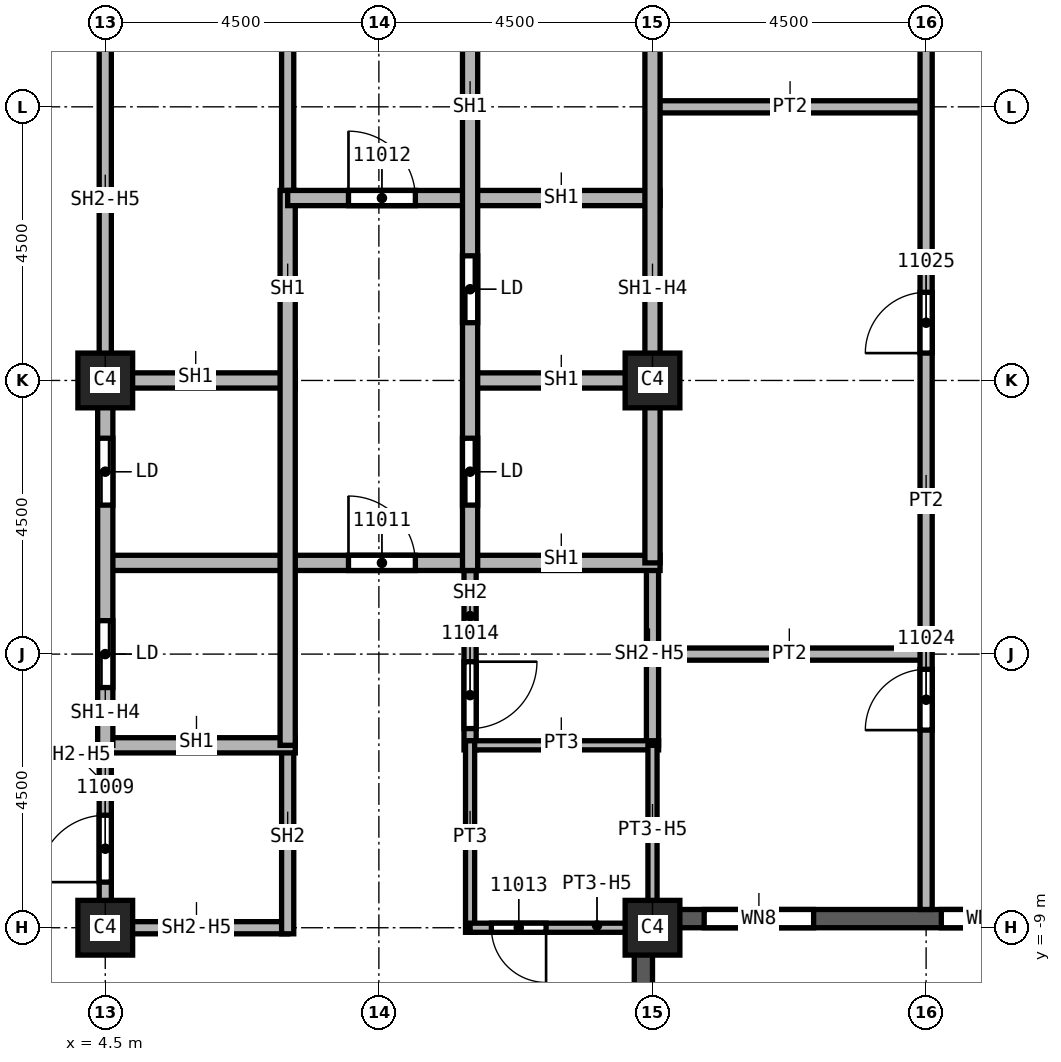
"""IFC4 building model, lengths in metres.
Left out: names, types, materials, properties, quantities, classifications, styles, units other than length and angle.
Written with IfcOpenShell. Run it as: python <this file> out.ifc"""

import sys

from ifc_helpers import new_model, si_unit, direction, frame, frame_2d, origin, origin_2d, place, context, subcontext, project, spatial, rectangle, extrude, element, fill, save


model = new_model("IFC4")
c1 = context("Model", 3, precision=1e-05, world=origin(), true_north=direction((0.0, 1.0)))
c2 = subcontext(c1, "Body", "Model", "MODEL_VIEW")
j1 = project(units=[si_unit("LENGTHUNIT", "METRE"), si_unit("PLANEANGLEUNIT", "RADIAN")], contexts=[c1])
p1 = place(None, origin())
s1 = spatial("IfcSite", under=j1, at=p1, CompositionType="ELEMENT")
p2 = place(p1, origin())
s2 = spatial("IfcBuilding", under=s1, at=p2, CompositionType="ELEMENT")
p3 = place(p2, frame((0.0, 0.0, 184.0)))
s3 = spatial("IfcBuildingStorey", under=s2, at=p3, CompositionType="ELEMENT", Elevation=184.0)
for number, where, z_axis, x_axis in (
    (1, (4.5, 0.0, 0.0), (0.0, 0.0, 1.0), (1.0, 0.0, 0.0)),
    (2, (4.5, -9.0, 0.0), (0.0, 0.0, 1.0), (1.0, 0.0, 0.0)),
    (3, (13.5, 0.0, 0.0), (0.0, 0.0, 1.0), (1.0, 0.0, 0.0)),
    (4, (13.5, -9.0, 0.0), (0.0, 0.0, 1.0), (1.0, 0.0, 0.0)),
):
    element("IfcColumn", number, at=place(p3, frame(where, z_axis=z_axis, x_axis=x_axis)), inside=s3, PredefinedType="COLUMN", context=c2, shape_type="SweptSolid", body=[
        extrude(rectangle(XDim=0.9, YDim=0.9, at=origin_2d()), origin(), (0.0, 0.0, 1.0), 3.72),
    ])
p4 = place(p3, frame((13.35, -17.5, 0.0), z_axis=(0.0, 0.0, 1.0), x_axis=(0.0, 1.0, 0.0)))
e5 = element("IfcWall", 5, at=p4, inside=s3, PredefinedType="SOLIDWALL", context=c2, shape_type="SweptSolid", body=[
    extrude(rectangle(XDim=8.475, YDim=0.3, at=frame_2d((4.238, 0.0))), origin(), (0.0, 0.0, 1.0), 3.12),
])
p5 = place(p4, frame((0.812, 0.0, 0.8)))
e6 = element("IfcOpeningElement", 6, at=p5, cuts=e5, PredefinedType="OPENING", context=c2, shape_type="SweptSolid", body=[
    extrude(rectangle(XDim=2.4, YDim=1.95, at=frame_2d((1.2, 0.975))), frame((0.0, 0.15, 0.0), z_axis=(0.0, -1.0, 0.0), x_axis=(1.0, 0.0, 0.0)), (0.0, 0.0, 1.0), 0.3),
])
p6 = place(p4, frame((5.431, 0.0, 0.8)))
e7 = element("IfcOpeningElement", 7, at=p6, cuts=e5, PredefinedType="OPENING", context=c2, shape_type="SweptSolid", body=[
    extrude(rectangle(XDim=1.8, YDim=1.95, at=frame_2d((0.9, 0.975))), frame((0.0, 0.15, 0.0), z_axis=(0.0, -1.0, 0.0), x_axis=(1.0, 0.0, 0.0)), (0.0, 0.0, 1.0), 0.3),
])
p7 = place(p3, frame((13.525, -8.85, 0.0), z_axis=(0.0, 0.0, 1.0), x_axis=(1.0, 0.0, 0.0)))
e8 = element("IfcWall", 8, at=p7, inside=s3, PredefinedType="SOLIDWALL", context=c2, shape_type="SweptSolid", body=[
    extrude(rectangle(XDim=8.475, YDim=0.3, at=frame_2d((4.238, 0.0))), origin(), (0.0, 0.0, 1.0), 3.12),
])
p8 = place(p7, frame((0.825, 0.0, 0.8)))
e9 = element("IfcOpeningElement", 9, at=p8, cuts=e8, PredefinedType="OPENING", context=c2, shape_type="SweptSolid", body=[
    extrude(rectangle(XDim=1.8, YDim=1.95, at=frame_2d((0.9, 0.975))), frame((0.0, 0.15, 0.0), z_axis=(0.0, -1.0, 0.0), x_axis=(1.0, 0.0, 0.0)), (0.0, 0.0, 1.0), 0.3),
])
p9 = place(p7, frame((4.725, 0.0, 0.8)))
e10 = element("IfcOpeningElement", 10, at=p9, cuts=e8, PredefinedType="OPENING", context=c2, shape_type="SweptSolid", body=[
    extrude(rectangle(XDim=1.4, YDim=1.95, at=frame_2d((0.7, 0.975))), frame((0.0, 0.15, 0.0), z_axis=(0.0, -1.0, 0.0), x_axis=(1.0, 0.0, 0.0)), (0.0, 0.0, 1.0), 0.3),
])
for number, where, z_axis, x_axis in (
    (11, (13.5, -4.5, 0.0), (0.0, 0.0, 1.0), (1.0, 0.0, 0.0)),
    (12, (13.5, 4.5, 0.0), (0.0, 0.0, 1.0), (1.0, 0.0, 0.0)),
):
    element("IfcWall", number, at=place(p3, frame(where, z_axis=z_axis, x_axis=x_axis)), inside=s3, PredefinedType="PARTITIONING", context=c2, shape_type="SweptSolid", body=[
        extrude(rectangle(XDim=4.5, YDim=0.2, at=frame_2d((2.25, 0.0))), origin(), (0.0, 0.0, 1.0), 3.72),
    ])
p10 = place(p3, frame((18.0, -8.7, 0.0), z_axis=(0.0, 0.0, 1.0), x_axis=(0.0, 1.0, 0.0)))
e13 = element("IfcWall", 13, at=p10, inside=s3, PredefinedType="PARTITIONING", context=c2, shape_type="SweptSolid", body=[
    extrude(rectangle(XDim=17.8, YDim=0.2, at=frame_2d((8.9, 0.0))), origin(), (0.0, 0.0, 1.0), 3.72),
])
p11 = place(p10, frame((2.95, 0.0, 0.0)))
e14 = element("IfcOpeningElement", 14, at=p11, cuts=e13, PredefinedType="OPENING", context=c2, shape_type="SweptSolid", body=[
    extrude(rectangle(XDim=1.0, YDim=2.1, at=frame_2d((0.5, 1.05))), frame((0.0, 0.1, 0.0), z_axis=(0.0, -1.0, 0.0), x_axis=(1.0, 0.0, 0.0)), (0.0, 0.0, 1.0), 0.2),
])
p12 = place(p10, frame((9.15, 0.0, 0.0)))
e15 = element("IfcOpeningElement", 15, at=p12, cuts=e13, PredefinedType="OPENING", context=c2, shape_type="SweptSolid", body=[
    extrude(rectangle(XDim=1.0, YDim=2.1, at=frame_2d((0.5, 1.05))), frame((0.0, 0.1, 0.0), z_axis=(0.0, -1.0, 0.0), x_axis=(1.0, 0.0, 0.0)), (0.0, 0.0, 1.0), 0.2),
])
p13 = place(p10, frame((15.0, 0.0, 0.0)))
e16 = element("IfcOpeningElement", 16, at=p13, cuts=e13, PredefinedType="OPENING", context=c2, shape_type="SweptSolid", body=[
    extrude(rectangle(XDim=1.0, YDim=2.1, at=frame_2d((0.5, 1.05))), frame((0.0, 0.1, 0.0), z_axis=(0.0, -1.0, 0.0), x_axis=(1.0, 0.0, 0.0)), (0.0, 0.0, 1.0), 0.2),
])
p14 = place(p3, frame((4.5, -9.1, 0.0), z_axis=(0.0, 0.0, 1.0), x_axis=(0.0, 1.0, 0.0)))
e17 = element("IfcWall", 17, at=p14, inside=s3, PredefinedType="SOLIDWALL", context=c2, shape_type="SweptSolid", body=[
    extrude(rectangle(XDim=3.1, YDim=0.2, at=frame_2d((1.55, 0.0))), origin(), (0.0, 0.0, 1.0), 2.958),
])
p15 = place(p14, frame((0.85, 0.0, 0.0)))
e18 = element("IfcOpeningElement", 18, at=p15, cuts=e17, PredefinedType="OPENING", context=c2, shape_type="SweptSolid", body=[
    extrude(rectangle(XDim=1.1, YDim=2.1, at=frame_2d((0.55, 1.05))), frame((0.0, 0.1, 0.0), z_axis=(0.0, -1.0, 0.0), x_axis=(1.0, 0.0, 0.0)), (0.0, 0.0, 1.0), 0.2),
])
p16 = place(p3, frame((4.5, 0.0, 0.0), z_axis=(0.0, 0.0, 1.0), x_axis=(0.0, 1.0, 0.0)))
e19 = element("IfcWall", 19, at=p16, inside=s3, PredefinedType="SOLIDWALL", context=c2, shape_type="SweptSolid", body=[
    extrude(rectangle(XDim=9.1, YDim=0.2, at=frame_2d((4.55, 0.0))), origin(), (0.0, 0.0, 1.0), 2.958),
])
p17 = place(p16, frame((5.8, 0.0, 0.0)))
e20 = element("IfcOpeningElement", 20, at=p17, cuts=e19, PredefinedType="OPENING", context=c2, shape_type="SweptSolid", body=[
    extrude(rectangle(XDim=1.1, YDim=2.1, at=frame_2d((0.55, 1.05))), frame((0.0, 0.1, 0.0), z_axis=(0.0, -1.0, 0.0), x_axis=(1.0, 0.0, 0.0)), (0.0, 0.0, 1.0), 0.2),
])
p18 = place(p3, frame((7.5, -9.0, 0.0), z_axis=(0.0, 0.0, 1.0), x_axis=(-1.0, 0.0, 0.0)))
e21 = element("IfcWall", 21, at=p18, inside=s3, PredefinedType="SOLIDWALL", context=c2, shape_type="SweptSolid", body=[
    extrude(rectangle(XDim=3.0, YDim=0.2, at=frame_2d((1.5, 0.0))), origin(), (0.0, 0.0, 1.0), 2.958),
])
p19 = place(p3, frame((7.5, -6.0, 0.0), z_axis=(0.0, 0.0, 1.0), x_axis=(0.0, -1.0, 0.0)))
e22 = element("IfcWall", 22, at=p19, inside=s3, PredefinedType="SOLIDWALL", context=c2, shape_type="SweptSolid", body=[
    extrude(rectangle(XDim=3.1, YDim=0.2, at=frame_2d((1.55, 0.0))), origin(), (0.0, 0.0, 1.0), 3.72),
])
p20 = place(p3, frame((7.5, 9.1, 0.0), z_axis=(0.0, 0.0, 1.0), x_axis=(0.0, -1.0, 0.0)))
e23 = element("IfcWall", 23, at=p20, inside=s3, PredefinedType="SOLIDWALL", context=c2, shape_type="SweptSolid", body=[
    extrude(rectangle(XDim=6.225, YDim=0.2, at=frame_2d((3.113, 0.0))), origin(), (0.0, 0.0, 1.0), 3.72),
])
p21 = place(p3, frame((10.5, -2.875, 0.0), z_axis=(0.0, 0.0, 1.0), x_axis=(0.0, -1.0, 0.0)))
e24 = element("IfcWall", 24, at=p21, inside=s3, PredefinedType="SOLIDWALL", context=c2, shape_type="SweptSolid", body=[
    extrude(rectangle(XDim=3.2, YDim=0.2, at=frame_2d((1.6, 0.0))), origin(), (0.0, 0.0, 1.0), 3.72),
])
p22 = place(p21, frame((1.75, 0.0, 0.0)))
e25 = element("IfcOpeningElement", 25, at=p22, cuts=e24, PredefinedType="OPENING", context=c2, shape_type="SweptSolid", body=[
    extrude(rectangle(XDim=1.1, YDim=2.1, at=frame_2d((0.55, 1.05))), frame((0.0, 0.1, 0.0), z_axis=(0.0, -1.0, 0.0), x_axis=(1.0, 0.0, 0.0)), (0.0, 0.0, 1.0), 0.2),
])
p23 = place(p3, frame((13.5, -3.0, 0.0), z_axis=(0.0, 0.0, 1.0), x_axis=(0.0, -1.0, 0.0)))
e26 = element("IfcWall", 26, at=p23, inside=s3, PredefinedType="SOLIDWALL", context=c2, shape_type="SweptSolid", body=[
    extrude(rectangle(XDim=3.0, YDim=0.2, at=frame_2d((1.5, 0.0))), origin(), (0.0, 0.0, 1.0), 2.958),
])
p24 = place(p3, frame((4.375, -6.0, 0.0), z_axis=(0.0, 0.0, 1.0), x_axis=(1.0, 0.0, 0.0)))
e27 = element("IfcWall", 27, at=p24, inside=s3, PredefinedType="SOLIDWALL", context=c2, shape_type="SweptSolid", body=[
    extrude(rectangle(XDim=3.25, YDim=0.25, at=frame_2d((1.625, 0.0))), origin(), (0.0, 0.0, 1.0), 3.72),
])
p25 = place(p3, frame((4.375, -3.0, 0.0), z_axis=(0.0, 0.0, 1.0), x_axis=(1.0, 0.0, 0.0)))
e28 = element("IfcWall", 28, at=p25, inside=s3, PredefinedType="SOLIDWALL", context=c2, shape_type="SweptSolid", body=[
    extrude(rectangle(XDim=9.25, YDim=0.25, at=frame_2d((4.625, 0.0))), origin(), (0.0, 0.0, 1.0), 3.72),
])
p26 = place(p25, frame((4.125, 0.0, 0.0)))
e29 = element("IfcOpeningElement", 29, at=p26, cuts=e28, PredefinedType="OPENING", context=c2, shape_type="SweptSolid", body=[
    extrude(rectangle(XDim=1.1, YDim=2.1, at=frame_2d((0.55, 1.05))), frame((0.0, 0.125, 0.0), z_axis=(0.0, -1.0, 0.0), x_axis=(1.0, 0.0, 0.0)), (0.0, 0.0, 1.0), 0.25),
])
p27 = place(p3, frame((4.375, 0.0, 0.0), z_axis=(0.0, 0.0, 1.0), x_axis=(1.0, 0.0, 0.0)))
e30 = element("IfcWall", 30, at=p27, inside=s3, PredefinedType="SOLIDWALL", context=c2, shape_type="SweptSolid", body=[
    extrude(rectangle(XDim=3.25, YDim=0.25, at=frame_2d((1.625, 0.0))), origin(), (0.0, 0.0, 1.0), 3.72),
])
p28 = place(p3, frame((4.5, -6.0, 0.0), z_axis=(0.0, 0.0, 1.0), x_axis=(0.0, 1.0, 0.0)))
e31 = element("IfcWall", 31, at=p28, inside=s3, PredefinedType="SOLIDWALL", context=c2, shape_type="SweptSolid", body=[
    extrude(rectangle(XDim=6.0, YDim=0.25, at=frame_2d((3.0, 0.0))), origin(), (0.0, 0.0, 1.0), 2.958),
])
p29 = place(p28, frame((0.95, 0.0, 0.0)))
e32 = element("IfcOpeningElement", 32, at=p29, cuts=e31, PredefinedType="OPENING", context=c2, shape_type="SweptSolid", body=[
    extrude(rectangle(XDim=1.1, YDim=2.1, at=frame_2d((0.55, 1.05))), frame((0.0, 0.125, 0.0), z_axis=(0.0, -1.0, 0.0), x_axis=(1.0, 0.0, 0.0)), (0.0, 0.0, 1.0), 0.25),
])
p30 = place(p28, frame((3.95, 0.0, 0.0)))
e33 = element("IfcOpeningElement", 33, at=p30, cuts=e31, PredefinedType="OPENING", context=c2, shape_type="SweptSolid", body=[
    extrude(rectangle(XDim=1.1, YDim=2.1, at=frame_2d((0.55, 1.05))), frame((0.0, 0.125, 0.0), z_axis=(0.0, -1.0, 0.0), x_axis=(1.0, 0.0, 0.0)), (0.0, 0.0, 1.0), 0.25),
])
p31 = place(p3, frame((7.5, 3.125, 0.0), z_axis=(0.0, 0.0, 1.0), x_axis=(0.0, -1.0, 0.0)))
e34 = element("IfcWall", 34, at=p31, inside=s3, PredefinedType="SOLIDWALL", context=c2, shape_type="SweptSolid", body=[
    extrude(rectangle(XDim=9.125, YDim=0.25, at=frame_2d((4.562, 0.0))), origin(), (0.0, 0.0, 1.0), 3.72),
])
p32 = place(p3, frame((7.5, 3.0, 0.0), z_axis=(0.0, 0.0, 1.0), x_axis=(1.0, 0.0, 0.0)))
e35 = element("IfcWall", 35, at=p32, inside=s3, PredefinedType="SOLIDWALL", context=c2, shape_type="SweptSolid", body=[
    extrude(rectangle(XDim=6.125, YDim=0.25, at=frame_2d((3.062, 0.0))), origin(), (0.0, 0.0, 1.0), 3.72),
])
p33 = place(p32, frame((1.0, 0.0, 0.0)))
e36 = element("IfcOpeningElement", 36, at=p33, cuts=e35, PredefinedType="OPENING", context=c2, shape_type="SweptSolid", body=[
    extrude(rectangle(XDim=1.1, YDim=2.1, at=frame_2d((0.55, 1.05))), frame((0.0, 0.125, 0.0), z_axis=(0.0, -1.0, 0.0), x_axis=(1.0, 0.0, 0.0)), (0.0, 0.0, 1.0), 0.25),
])
p34 = place(p3, frame((10.5, 0.0, 0.0), z_axis=(0.0, 0.0, 1.0), x_axis=(1.0, 0.0, 0.0)))
e37 = element("IfcWall", 37, at=p34, inside=s3, PredefinedType="SOLIDWALL", context=c2, shape_type="SweptSolid", body=[
    extrude(rectangle(XDim=3.125, YDim=0.25, at=frame_2d((1.562, 0.0))), origin(), (0.0, 0.0, 1.0), 3.72),
])
p35 = place(p3, frame((10.5, 6.125, 0.0), z_axis=(0.0, 0.0, 1.0), x_axis=(0.0, -1.0, 0.0)))
e38 = element("IfcWall", 38, at=p35, inside=s3, PredefinedType="SOLIDWALL", context=c2, shape_type="SweptSolid", body=[
    extrude(rectangle(XDim=9.25, YDim=0.25, at=frame_2d((4.625, 0.0))), origin(), (0.0, 0.0, 1.0), 3.72),
])
p36 = place(p35, frame((7.075, 0.0, 0.0)))
e39 = element("IfcOpeningElement", 39, at=p36, cuts=e38, PredefinedType="OPENING", context=c2, shape_type="SweptSolid", body=[
    extrude(rectangle(XDim=1.1, YDim=2.1, at=frame_2d((0.55, 1.05))), frame((0.0, 0.125, 0.0), z_axis=(0.0, -1.0, 0.0), x_axis=(1.0, 0.0, 0.0)), (0.0, 0.0, 1.0), 0.25),
])
p37 = place(p35, frame((4.075, 0.0, 0.0)))
e40 = element("IfcOpeningElement", 40, at=p37, cuts=e38, PredefinedType="OPENING", context=c2, shape_type="SweptSolid", body=[
    extrude(rectangle(XDim=1.1, YDim=2.1, at=frame_2d((0.55, 1.05))), frame((0.0, 0.125, 0.0), z_axis=(0.0, -1.0, 0.0), x_axis=(1.0, 0.0, 0.0)), (0.0, 0.0, 1.0), 0.25),
])
p38 = place(p3, frame((13.5, 6.0, 0.0), z_axis=(0.0, 0.0, 1.0), x_axis=(0.0, -1.0, 0.0)))
e41 = element("IfcWall", 41, at=p38, inside=s3, PredefinedType="SOLIDWALL", context=c2, shape_type="SweptSolid", body=[
    extrude(rectangle(XDim=9.0, YDim=0.25, at=frame_2d((4.5, 0.0))), origin(), (0.0, 0.0, 1.0), 2.958),
])
p39 = place(p3, frame((10.5, -6.0, 0.0), z_axis=(0.0, 0.0, 1.0), x_axis=(1.0, 0.0, 0.0)))
e42 = element("IfcWall", 42, at=p39, inside=s3, PredefinedType="PARTITIONING", context=c2, shape_type="SweptSolid", body=[
    extrude(rectangle(XDim=3.1, YDim=0.15, at=frame_2d((1.55, 0.0))), origin(), (0.0, 0.0, 1.0), 3.72),
])
p40 = place(p3, frame((10.5, -5.925, 0.0), z_axis=(0.0, 0.0, 1.0), x_axis=(0.0, -1.0, 0.0)))
e43 = element("IfcWall", 43, at=p40, inside=s3, PredefinedType="PARTITIONING", context=c2, shape_type="SweptSolid", body=[
    extrude(rectangle(XDim=3.15, YDim=0.15, at=frame_2d((1.575, 0.0))), origin(), (0.0, 0.0, 1.0), 3.72),
])
p41 = place(p3, frame((13.5, -6.0, 0.0), z_axis=(0.0, 0.0, 1.0), x_axis=(0.0, -1.0, 0.0)))
e44 = element("IfcWall", 44, at=p41, inside=s3, PredefinedType="PARTITIONING", context=c2, shape_type="SweptSolid", body=[
    extrude(rectangle(XDim=3.0, YDim=0.15, at=frame_2d((1.5, 0.0))), origin(), (0.0, 0.0, 1.0), 2.958),
])
p42 = place(p3, frame((13.525, -9.0, 0.0), z_axis=(0.0, 0.0, 1.0), x_axis=(-1.0, 0.0, 0.0)))
e45 = element("IfcWall", 45, at=p42, inside=s3, PredefinedType="PARTITIONING", context=c2, shape_type="SweptSolid", body=[
    extrude(rectangle(XDim=3.025, YDim=0.15, at=frame_2d((1.512, 0.0))), origin(), (0.0, 0.0, 1.0), 2.958),
])
p43 = place(p42, frame((1.775, 0.0, 0.0)))
e46 = element("IfcOpeningElement", 46, at=p43, cuts=e45, PredefinedType="OPENING", context=c2, shape_type="SweptSolid", body=[
    extrude(rectangle(XDim=0.9, YDim=2.1, at=frame_2d((0.45, 1.05))), frame((0.0, 0.075, 0.0), z_axis=(0.0, -1.0, 0.0), x_axis=(1.0, 0.0, 0.0)), (0.0, 0.0, 1.0), 0.15),
])
p44 = place(p15, origin())
e47 = element("IfcDoor", 47, at=p44, inside=s3, OperationType="SINGLE_SWING_RIGHT", PredefinedType="DOOR", context=c2, shape_type="SweptSolid", body=[
    extrude(rectangle(XDim=1.1, YDim=2.1, at=frame_2d((0.55, 1.05))), frame((0.0, 0.025, 0.0), z_axis=(0.0, -1.0, 0.0), x_axis=(1.0, 0.0, 0.0)), (0.0, 0.0, 1.0), 0.05),
])
fill(e18, e47)
p45 = place(p26, origin())
e48 = element("IfcDoor", 48, at=p45, inside=s3, OperationType="SINGLE_SWING_RIGHT", PredefinedType="DOOR", context=c2, shape_type="SweptSolid", body=[
    extrude(rectangle(XDim=1.1, YDim=2.1, at=frame_2d((0.55, 1.05))), frame((0.0, 0.025, 0.0), z_axis=(0.0, -1.0, 0.0), x_axis=(1.0, 0.0, 0.0)), (0.0, 0.0, 1.0), 0.05),
])
fill(e29, e48)
p46 = place(p33, origin())
e49 = element("IfcDoor", 49, at=p46, inside=s3, OperationType="SINGLE_SWING_LEFT", PredefinedType="DOOR", context=c2, shape_type="SweptSolid", body=[
    extrude(rectangle(XDim=1.1, YDim=2.1, at=frame_2d((0.55, 1.05))), frame((0.0, 0.025, 0.0), z_axis=(0.0, -1.0, 0.0), x_axis=(1.0, 0.0, 0.0)), (0.0, 0.0, 1.0), 0.05),
])
fill(e36, e49)
p47 = place(p43, origin())
e50 = element("IfcDoor", 50, at=p47, inside=s3, OperationType="SINGLE_SWING_RIGHT", PredefinedType="DOOR", context=c2, shape_type="SweptSolid", body=[
    extrude(rectangle(XDim=0.9, YDim=2.1, at=frame_2d((0.45, 1.05))), frame((0.0, 0.025, 0.0), z_axis=(0.0, -1.0, 0.0), x_axis=(1.0, 0.0, 0.0)), (0.0, 0.0, 1.0), 0.05),
])
fill(e46, e50)
p48 = place(p22, origin())
e51 = element("IfcDoor", 51, at=p48, inside=s3, OperationType="SINGLE_SWING_LEFT", PredefinedType="DOOR", context=c2, shape_type="SweptSolid", body=[
    extrude(rectangle(XDim=1.1, YDim=2.1, at=frame_2d((0.55, 1.05))), frame((0.0, 0.025, 0.0), z_axis=(0.0, -1.0, 0.0), x_axis=(1.0, 0.0, 0.0)), (0.0, 0.0, 1.0), 0.05),
])
fill(e25, e51)
p49 = place(p11, origin())
e52 = element("IfcDoor", 52, at=p49, inside=s3, OperationType="SINGLE_SWING_LEFT", PredefinedType="DOOR", context=c2, shape_type="SweptSolid", body=[
    extrude(rectangle(XDim=1.0, YDim=2.1, at=frame_2d((0.5, 1.05))), frame((0.0, 0.025, 0.0), z_axis=(0.0, -1.0, 0.0), x_axis=(1.0, 0.0, 0.0)), (0.0, 0.0, 1.0), 0.05),
])
fill(e14, e52)
p50 = place(p12, origin())
e53 = element("IfcDoor", 53, at=p50, inside=s3, OperationType="SINGLE_SWING_RIGHT", PredefinedType="DOOR", context=c2, shape_type="SweptSolid", body=[
    extrude(rectangle(XDim=1.0, YDim=2.1, at=frame_2d((0.5, 1.05))), frame((0.0, 0.025, 0.0), z_axis=(0.0, -1.0, 0.0), x_axis=(1.0, 0.0, 0.0)), (0.0, 0.0, 1.0), 0.05),
])
fill(e15, e53)
p51 = place(p29, origin())
e54 = element("IfcDoor", 54, at=p51, inside=s3, OperationType="SLIDING_TO_LEFT", PredefinedType="DOOR", context=c2, shape_type="SweptSolid", body=[
    extrude(rectangle(XDim=1.1, YDim=2.1, at=frame_2d((0.55, 1.05))), frame((0.0, 0.025, 0.0), z_axis=(0.0, -1.0, 0.0), x_axis=(1.0, 0.0, 0.0)), (0.0, 0.0, 1.0), 0.05),
])
fill(e32, e54)
p52 = place(p30, origin())
e55 = element("IfcDoor", 55, at=p52, inside=s3, OperationType="SLIDING_TO_LEFT", PredefinedType="DOOR", context=c2, shape_type="SweptSolid", body=[
    extrude(rectangle(XDim=1.1, YDim=2.1, at=frame_2d((0.55, 1.05))), frame((0.0, 0.025, 0.0), z_axis=(0.0, -1.0, 0.0), x_axis=(1.0, 0.0, 0.0)), (0.0, 0.0, 1.0), 0.05),
])
fill(e33, e55)
p53 = place(p36, origin())
e56 = element("IfcDoor", 56, at=p53, inside=s3, OperationType="SLIDING_TO_LEFT", PredefinedType="DOOR", context=c2, shape_type="SweptSolid", body=[
    extrude(rectangle(XDim=1.1, YDim=2.1, at=frame_2d((0.55, 1.05))), frame((0.0, 0.025, 0.0), z_axis=(0.0, -1.0, 0.0), x_axis=(1.0, 0.0, 0.0)), (0.0, 0.0, 1.0), 0.05),
])
fill(e39, e56)
p54 = place(p37, origin())
e57 = element("IfcDoor", 57, at=p54, inside=s3, OperationType="SLIDING_TO_LEFT", PredefinedType="DOOR", context=c2, shape_type="SweptSolid", body=[
    extrude(rectangle(XDim=1.1, YDim=2.1, at=frame_2d((0.55, 1.05))), frame((0.0, 0.025, 0.0), z_axis=(0.0, -1.0, 0.0), x_axis=(1.0, 0.0, 0.0)), (0.0, 0.0, 1.0), 0.05),
])
fill(e40, e57)
p55 = place(p8, origin())
e58 = element("IfcWindow", 58, at=p55, inside=s3, PartitioningType="SINGLE_PANEL", PredefinedType="WINDOW", context=c2, shape_type="SweptSolid", body=[
    extrude(rectangle(XDim=1.8, YDim=1.95, at=frame_2d((0.9, 0.975))), frame((0.0, 0.03, 0.0), z_axis=(0.0, -1.0, 0.0), x_axis=(1.0, 0.0, 0.0)), (0.0, 0.0, 1.0), 0.06),
])
fill(e9, e58)
p56 = place(p9, origin())
e59 = element("IfcWindow", 59, at=p56, inside=s3, PartitioningType="SINGLE_PANEL", PredefinedType="WINDOW", context=c2, shape_type="SweptSolid", body=[
    extrude(rectangle(XDim=1.4, YDim=1.95, at=frame_2d((0.7, 0.975))), frame((0.0, 0.03, 0.0), z_axis=(0.0, -1.0, 0.0), x_axis=(1.0, 0.0, 0.0)), (0.0, 0.0, 1.0), 0.06),
])
fill(e10, e59)
save(model, sys.argv[1])
